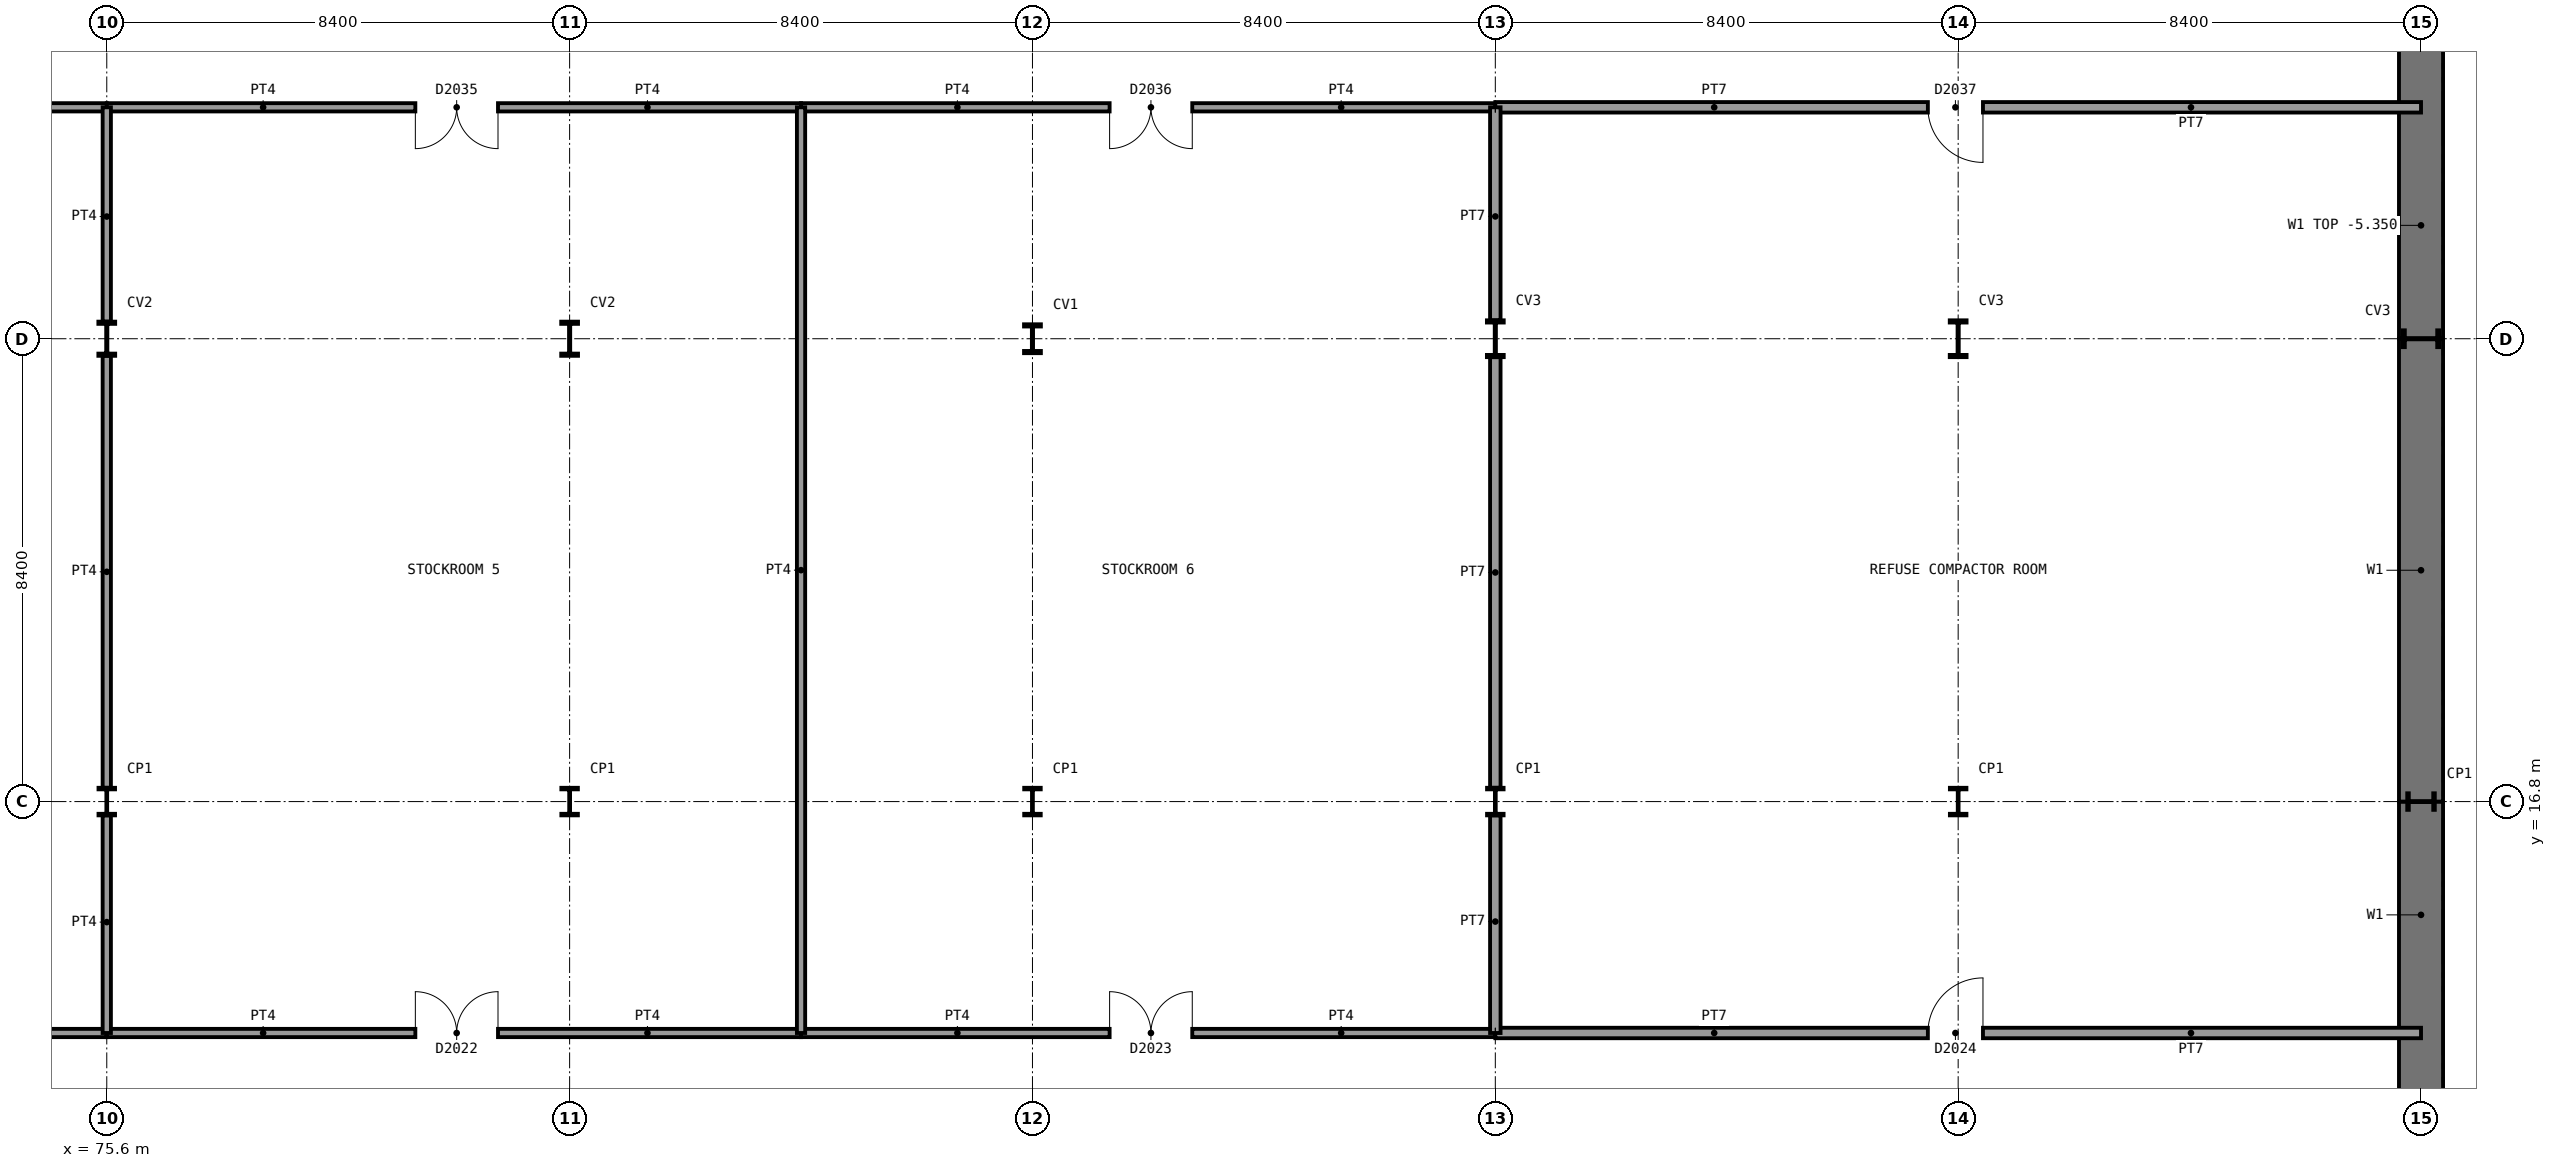
"""IFC4 building model, lengths in metres.
Left out: names, types, materials, properties, quantities, classifications, styles, units other than length and angle.
Written with IfcOpenShell. Run it as: python <this file> out.ifc"""

import sys

from ifc_helpers import new_model, si_unit, direction, frame, frame_2d, origin, origin_2d, place, context, subcontext, project, spatial, rectangle, i_section, extrude, element, fill, save


model = new_model("IFC4")
c1 = context("Model", 3, precision=1e-05, world=origin(), true_north=direction((0.0, 1.0)))
c2 = subcontext(c1, "Body", "Model", "MODEL_VIEW")
j1 = project(units=[si_unit("LENGTHUNIT", "METRE"), si_unit("PLANEANGLEUNIT", "RADIAN")], contexts=[c1])
p1 = place(None, origin())
s1 = spatial("IfcSite", under=j1, at=p1, CompositionType="ELEMENT")
p2 = place(p1, origin())
s2 = spatial("IfcBuilding", under=s1, at=p2, CompositionType="ELEMENT")
p3 = place(p2, frame((0.0, 0.0, -9.9)))
s3 = spatial("IfcBuildingStorey", under=s2, at=p3, CompositionType="ELEMENT", Elevation=-9.9)
p4 = place(p3, frame((117.6, 8.55, 0.0), z_axis=(0.0, 0.0, 1.0), x_axis=(0.0, 1.0, 0.0)))
e1 = element("IfcWall", 1, at=p4, inside=s3, PredefinedType="SOLIDWALL", context=c2, shape_type="SweptSolid", body=[
    extrude(rectangle(XDim=8.25, YDim=0.8, at=frame_2d((4.125, 0.0))), origin(), (0.0, 0.0, 1.0), 4.65),
])
p5 = place(p3, frame((117.6, 16.8, 0.0), z_axis=(0.0, 0.0, 1.0), x_axis=(0.0, 1.0, 0.0)))
e2 = element("IfcWall", 2, at=p5, inside=s3, PredefinedType="SOLIDWALL", context=c2, shape_type="SweptSolid", body=[
    extrude(rectangle(XDim=8.4, YDim=0.8, at=frame_2d((4.2, 0.0))), origin(), (0.0, 0.0, 1.0), 4.65),
])
p6 = place(p3, frame((117.6, 25.2, 0.0), z_axis=(0.0, 0.0, 1.0), x_axis=(0.0, 1.0, 0.0)))
e3 = element("IfcWall", 3, at=p6, inside=s3, PredefinedType="SOLIDWALL", context=c2, shape_type="SweptSolid", body=[
    extrude(rectangle(XDim=12.6, YDim=0.8, at=frame_2d((6.3, 0.0))), origin(), (0.0, 0.0, 1.0), 4.55),
])
p7 = place(p3, frame((75.6, 16.8, 0.0), z_axis=(0.0, 0.0, 1.0), x_axis=(1.0, 0.0, 0.0)))
e4 = element("IfcColumn", 4, at=p7, inside=s3, PredefinedType="COLUMN", context=c2, shape_type="SweptSolid", body=[
    extrude(i_section(OverallWidth=0.3, OverallDepth=0.5, WebThickness=0.014, FlangeThickness=0.028, FilletRadius=0.027, at=origin_2d()), origin(), (0.0, 0.0, 1.0), 5.0),
])
p8 = place(p3, frame((75.6, 25.2, 0.0), z_axis=(0.0, 0.0, 1.0), x_axis=(1.0, 0.0, 0.0)))
e5 = element("IfcColumn", 5, at=p8, inside=s3, PredefinedType="COLUMN", context=c2, shape_type="SweptSolid", body=[
    extrude(i_section(OverallWidth=0.305, OverallDepth=0.62, WebThickness=0.021, FlangeThickness=0.04, FilletRadius=0.027, at=origin_2d()), origin(), (0.0, 0.0, 1.0), 5.0),
])
p9 = place(p3, frame((84.0, 16.8, 0.0), z_axis=(0.0, 0.0, 1.0), x_axis=(1.0, 0.0, 0.0)))
e6 = element("IfcColumn", 6, at=p9, inside=s3, PredefinedType="COLUMN", context=c2, shape_type="SweptSolid", body=[
    extrude(i_section(OverallWidth=0.3, OverallDepth=0.5, WebThickness=0.014, FlangeThickness=0.028, FilletRadius=0.027, at=origin_2d()), origin(), (0.0, 0.0, 1.0), 5.0),
])
p10 = place(p3, frame((84.0, 25.2, 0.0), z_axis=(0.0, 0.0, 1.0), x_axis=(1.0, 0.0, 0.0)))
e7 = element("IfcColumn", 7, at=p10, inside=s3, PredefinedType="COLUMN", context=c2, shape_type="SweptSolid", body=[
    extrude(i_section(OverallWidth=0.305, OverallDepth=0.62, WebThickness=0.021, FlangeThickness=0.04, FilletRadius=0.027, at=origin_2d()), origin(), (0.0, 0.0, 1.0), 5.0),
])
p11 = place(p3, frame((92.4, 16.8, 0.0), z_axis=(0.0, 0.0, 1.0), x_axis=(1.0, 0.0, 0.0)))
e8 = element("IfcColumn", 8, at=p11, inside=s3, PredefinedType="COLUMN", context=c2, shape_type="SweptSolid", body=[
    extrude(i_section(OverallWidth=0.3, OverallDepth=0.5, WebThickness=0.014, FlangeThickness=0.028, FilletRadius=0.027, at=origin_2d()), origin(), (0.0, 0.0, 1.0), 5.0),
])
p12 = place(p3, frame((92.4, 25.2, 0.0), z_axis=(0.0, 0.0, 1.0), x_axis=(1.0, 0.0, 0.0)))
e9 = element("IfcColumn", 9, at=p12, inside=s3, PredefinedType="COLUMN", context=c2, shape_type="SweptSolid", body=[
    extrude(i_section(OverallWidth=0.306, OverallDepth=0.524, WebThickness=0.021, FlangeThickness=0.04, FilletRadius=0.027, at=origin_2d()), origin(), (0.0, 0.0, 1.0), 5.0),
])
p13 = place(p3, frame((100.8, 16.8, 0.0), z_axis=(0.0, 0.0, 1.0), x_axis=(1.0, 0.0, 0.0)))
e10 = element("IfcColumn", 10, at=p13, inside=s3, PredefinedType="COLUMN", context=c2, shape_type="SweptSolid", body=[
    extrude(i_section(OverallWidth=0.3, OverallDepth=0.5, WebThickness=0.014, FlangeThickness=0.028, FilletRadius=0.027, at=origin_2d()), origin(), (0.0, 0.0, 1.0), 5.0),
])
p14 = place(p3, frame((100.8, 25.2, 0.0), z_axis=(0.0, 0.0, 1.0), x_axis=(1.0, 0.0, 0.0)))
e11 = element("IfcColumn", 11, at=p14, inside=s3, PredefinedType="COLUMN", context=c2, shape_type="SweptSolid", body=[
    extrude(i_section(OverallWidth=0.305, OverallDepth=0.668, WebThickness=0.021, FlangeThickness=0.04, FilletRadius=0.027, at=origin_2d()), origin(), (0.0, 0.0, 1.0), 5.0),
])
p15 = place(p3, frame((109.2, 16.8, 0.0), z_axis=(0.0, 0.0, 1.0), x_axis=(1.0, 0.0, 0.0)))
e12 = element("IfcColumn", 12, at=p15, inside=s3, PredefinedType="COLUMN", context=c2, shape_type="SweptSolid", body=[
    extrude(i_section(OverallWidth=0.3, OverallDepth=0.5, WebThickness=0.014, FlangeThickness=0.028, FilletRadius=0.027, at=origin_2d()), origin(), (0.0, 0.0, 1.0), 5.0),
])
p16 = place(p3, frame((109.2, 25.2, 0.0), z_axis=(0.0, 0.0, 1.0), x_axis=(1.0, 0.0, 0.0)))
e13 = element("IfcColumn", 13, at=p16, inside=s3, PredefinedType="COLUMN", context=c2, shape_type="SweptSolid", body=[
    extrude(i_section(OverallWidth=0.305, OverallDepth=0.668, WebThickness=0.021, FlangeThickness=0.04, FilletRadius=0.027, at=origin_2d()), origin(), (0.0, 0.0, 1.0), 5.0),
])
p17 = place(p3, frame((117.6, 16.8, 0.0), z_axis=(0.0, 0.0, 1.0), x_axis=(0.0, 1.0, 0.0)))
e14 = element("IfcColumn", 14, at=p17, inside=s3, PredefinedType="COLUMN", context=c2, shape_type="SweptSolid", body=[
    extrude(i_section(OverallWidth=0.3, OverallDepth=0.5, WebThickness=0.014, FlangeThickness=0.028, FilletRadius=0.027, at=origin_2d()), origin(), (0.0, 0.0, 1.0), 5.0),
])
p18 = place(p3, frame((117.6, 25.2, 0.0), z_axis=(0.0, 0.0, 1.0), x_axis=(0.0, 1.0, 0.0)))
e15 = element("IfcColumn", 15, at=p18, inside=s3, PredefinedType="COLUMN", context=c2, shape_type="SweptSolid", body=[
    extrude(i_section(OverallWidth=0.305, OverallDepth=0.668, WebThickness=0.021, FlangeThickness=0.04, FilletRadius=0.027, at=origin_2d()), origin(), (0.0, 0.0, 1.0), 5.0),
])
p19 = place(p3, frame((58.8, 12.6, 0.0), z_axis=(0.0, 0.0, 1.0), x_axis=(1.0, 0.0, 0.0)))
e16 = element("IfcWall", 16, at=p19, inside=s3, PredefinedType="SOLIDWALL", context=c2, shape_type="SweptSolid", body=[
    extrude(rectangle(XDim=16.8, YDim=0.15, at=frame_2d((8.4, 0.0))), origin(), (0.0, 0.0, 1.0), 4.55),
])
p20 = place(p19, frame((7.6, 0.0, 0.0)))
e17 = element("IfcOpeningElement", 17, at=p20, cuts=e16, PredefinedType="OPENING", context=c2, shape_type="SweptSolid", body=[
    extrude(rectangle(XDim=1.5, YDim=2.1, at=frame_2d((0.75, 1.05))), frame((0.0, 0.085, 0.0), z_axis=(0.0, -1.0, 0.0), x_axis=(1.0, 0.0, 0.0)), (0.0, 0.0, 1.0), 0.17),
])
p21 = place(p3, frame((75.6, 12.6, 0.0), z_axis=(0.0, 0.0, 1.0), x_axis=(1.0, 0.0, 0.0)))
e18 = element("IfcWall", 18, at=p21, inside=s3, PredefinedType="SOLIDWALL", context=c2, shape_type="SweptSolid", body=[
    extrude(rectangle(XDim=12.6, YDim=0.15, at=frame_2d((6.3, 0.0))), origin(), (0.0, 0.0, 1.0), 4.55),
])
p22 = place(p21, frame((5.6, 0.0, 0.0)))
e19 = element("IfcOpeningElement", 19, at=p22, cuts=e18, PredefinedType="OPENING", context=c2, shape_type="SweptSolid", body=[
    extrude(rectangle(XDim=1.5, YDim=2.1, at=frame_2d((0.75, 1.05))), frame((0.0, 0.085, 0.0), z_axis=(0.0, -1.0, 0.0), x_axis=(1.0, 0.0, 0.0)), (0.0, 0.0, 1.0), 0.17),
])
p23 = place(p3, frame((88.2, 12.6, 0.0), z_axis=(0.0, 0.0, 1.0), x_axis=(1.0, 0.0, 0.0)))
e20 = element("IfcWall", 20, at=p23, inside=s3, PredefinedType="SOLIDWALL", context=c2, shape_type="SweptSolid", body=[
    extrude(rectangle(XDim=12.6, YDim=0.15, at=frame_2d((6.3, 0.0))), origin(), (0.0, 0.0, 1.0), 4.55),
])
p24 = place(p23, frame((5.6, 0.0, 0.0)))
e21 = element("IfcOpeningElement", 21, at=p24, cuts=e20, PredefinedType="OPENING", context=c2, shape_type="SweptSolid", body=[
    extrude(rectangle(XDim=1.5, YDim=2.1, at=frame_2d((0.75, 1.05))), frame((0.0, 0.085, 0.0), z_axis=(0.0, -1.0, 0.0), x_axis=(1.0, 0.0, 0.0)), (0.0, 0.0, 1.0), 0.17),
])
p25 = place(p3, frame((100.8, 12.6, 0.0), z_axis=(0.0, 0.0, 1.0), x_axis=(1.0, 0.0, 0.0)))
e22 = element("IfcWall", 22, at=p25, inside=s3, PredefinedType="SOLIDWALL", context=c2, shape_type="SweptSolid", body=[
    extrude(rectangle(XDim=16.8, YDim=0.19, at=frame_2d((8.4, 0.0))), origin(), (0.0, 0.0, 1.0), 4.55),
])
p26 = place(p25, frame((7.85, 0.0, 0.0)))
e23 = element("IfcOpeningElement", 23, at=p26, cuts=e22, PredefinedType="OPENING", context=c2, shape_type="SweptSolid", body=[
    extrude(rectangle(XDim=1.0, YDim=2.1, at=frame_2d((0.5, 1.05))), frame((0.0, 0.105, 0.0), z_axis=(0.0, -1.0, 0.0), x_axis=(1.0, 0.0, 0.0)), (0.0, 0.0, 1.0), 0.21),
])
p27 = place(p3, frame((58.8, 29.4, 0.0), z_axis=(0.0, 0.0, 1.0), x_axis=(1.0, 0.0, 0.0)))
e24 = element("IfcWall", 24, at=p27, inside=s3, PredefinedType="SOLIDWALL", context=c2, shape_type="SweptSolid", body=[
    extrude(rectangle(XDim=16.8, YDim=0.15, at=frame_2d((8.4, 0.0))), origin(), (0.0, 0.0, 1.0), 4.55),
])
p28 = place(p27, frame((7.6, 0.0, 0.0)))
e25 = element("IfcOpeningElement", 25, at=p28, cuts=e24, PredefinedType="OPENING", context=c2, shape_type="SweptSolid", body=[
    extrude(rectangle(XDim=1.5, YDim=2.1, at=frame_2d((0.75, 1.05))), frame((0.0, 0.085, 0.0), z_axis=(0.0, -1.0, 0.0), x_axis=(1.0, 0.0, 0.0)), (0.0, 0.0, 1.0), 0.17),
])
p29 = place(p3, frame((75.6, 29.4, 0.0), z_axis=(0.0, 0.0, 1.0), x_axis=(1.0, 0.0, 0.0)))
e26 = element("IfcWall", 26, at=p29, inside=s3, PredefinedType="SOLIDWALL", context=c2, shape_type="SweptSolid", body=[
    extrude(rectangle(XDim=12.6, YDim=0.15, at=frame_2d((6.3, 0.0))), origin(), (0.0, 0.0, 1.0), 4.55),
])
p30 = place(p29, frame((5.6, 0.0, 0.0)))
e27 = element("IfcOpeningElement", 27, at=p30, cuts=e26, PredefinedType="OPENING", context=c2, shape_type="SweptSolid", body=[
    extrude(rectangle(XDim=1.5, YDim=2.1, at=frame_2d((0.75, 1.05))), frame((0.0, 0.085, 0.0), z_axis=(0.0, -1.0, 0.0), x_axis=(1.0, 0.0, 0.0)), (0.0, 0.0, 1.0), 0.17),
])
p31 = place(p3, frame((88.2, 29.4, 0.0), z_axis=(0.0, 0.0, 1.0), x_axis=(1.0, 0.0, 0.0)))
e28 = element("IfcWall", 28, at=p31, inside=s3, PredefinedType="SOLIDWALL", context=c2, shape_type="SweptSolid", body=[
    extrude(rectangle(XDim=12.6, YDim=0.15, at=frame_2d((6.3, 0.0))), origin(), (0.0, 0.0, 1.0), 4.55),
])
p32 = place(p31, frame((5.6, 0.0, 0.0)))
e29 = element("IfcOpeningElement", 29, at=p32, cuts=e28, PredefinedType="OPENING", context=c2, shape_type="SweptSolid", body=[
    extrude(rectangle(XDim=1.5, YDim=2.1, at=frame_2d((0.75, 1.05))), frame((0.0, 0.085, 0.0), z_axis=(0.0, -1.0, 0.0), x_axis=(1.0, 0.0, 0.0)), (0.0, 0.0, 1.0), 0.17),
])
p33 = place(p3, frame((100.8, 29.4, 0.0), z_axis=(0.0, 0.0, 1.0), x_axis=(1.0, 0.0, 0.0)))
e30 = element("IfcWall", 30, at=p33, inside=s3, PredefinedType="SOLIDWALL", context=c2, shape_type="SweptSolid", body=[
    extrude(rectangle(XDim=16.8, YDim=0.19, at=frame_2d((8.4, 0.0))), origin(), (0.0, 0.0, 1.0), 4.55),
])
p34 = place(p33, frame((7.85, 0.0, 0.0)))
e31 = element("IfcOpeningElement", 31, at=p34, cuts=e30, PredefinedType="OPENING", context=c2, shape_type="SweptSolid", body=[
    extrude(rectangle(XDim=1.0, YDim=2.1, at=frame_2d((0.5, 1.05))), frame((0.0, 0.105, 0.0), z_axis=(0.0, -1.0, 0.0), x_axis=(1.0, 0.0, 0.0)), (0.0, 0.0, 1.0), 0.21),
])
p35 = place(p3, frame((75.6, 12.6, 0.0), z_axis=(0.0, 0.0, 1.0), x_axis=(0.0, 1.0, 0.0)))
e32 = element("IfcWall", 32, at=p35, inside=s3, PredefinedType="SOLIDWALL", context=c2, shape_type="SweptSolid", body=[
    extrude(rectangle(XDim=3.95, YDim=0.15, at=frame_2d((1.975, 0.0))), origin(), (0.0, 0.0, 1.0), 4.55),
])
p36 = place(p3, frame((75.6, 17.05, 0.0), z_axis=(0.0, 0.0, 1.0), x_axis=(0.0, 1.0, 0.0)))
e33 = element("IfcWall", 33, at=p36, inside=s3, PredefinedType="SOLIDWALL", context=c2, shape_type="SweptSolid", body=[
    extrude(rectangle(XDim=7.84, YDim=0.15, at=frame_2d((3.92, 0.0))), origin(), (0.0, 0.0, 1.0), 4.55),
])
p37 = place(p3, frame((75.6, 25.51, 0.0), z_axis=(0.0, 0.0, 1.0), x_axis=(0.0, 1.0, 0.0)))
e34 = element("IfcWall", 34, at=p37, inside=s3, PredefinedType="SOLIDWALL", context=c2, shape_type="SweptSolid", body=[
    extrude(rectangle(XDim=3.89, YDim=0.15, at=frame_2d((1.945, 0.0))), origin(), (0.0, 0.0, 1.0), 4.55),
])
p38 = place(p3, frame((88.2, 12.6, 0.0), z_axis=(0.0, 0.0, 1.0), x_axis=(0.0, 1.0, 0.0)))
e35 = element("IfcWall", 35, at=p38, inside=s3, PredefinedType="SOLIDWALL", context=c2, shape_type="SweptSolid", body=[
    extrude(rectangle(XDim=16.8, YDim=0.15, at=frame_2d((8.4, 0.0))), origin(), (0.0, 0.0, 1.0), 4.55),
])
p39 = place(p3, frame((100.8, 12.6, 0.0), z_axis=(0.0, 0.0, 1.0), x_axis=(0.0, 1.0, 0.0)))
e36 = element("IfcWall", 36, at=p39, inside=s3, PredefinedType="SOLIDWALL", context=c2, shape_type="SweptSolid", body=[
    extrude(rectangle(XDim=3.95, YDim=0.19, at=frame_2d((1.975, 0.0))), origin(), (0.0, 0.0, 1.0), 4.55),
])
p40 = place(p3, frame((100.8, 17.05, 0.0), z_axis=(0.0, 0.0, 1.0), x_axis=(0.0, 1.0, 0.0)))
e37 = element("IfcWall", 37, at=p40, inside=s3, PredefinedType="SOLIDWALL", context=c2, shape_type="SweptSolid", body=[
    extrude(rectangle(XDim=7.816, YDim=0.19, at=frame_2d((3.908, 0.0))), origin(), (0.0, 0.0, 1.0), 4.55),
])
p41 = place(p3, frame((100.8, 25.534, 0.0), z_axis=(0.0, 0.0, 1.0), x_axis=(0.0, 1.0, 0.0)))
e38 = element("IfcWall", 38, at=p41, inside=s3, PredefinedType="SOLIDWALL", context=c2, shape_type="SweptSolid", body=[
    extrude(rectangle(XDim=3.866, YDim=0.19, at=frame_2d((1.933, 0.0))), origin(), (0.0, 0.0, 1.0), 4.55),
])
p42 = place(p22, origin())
e39 = element("IfcDoor", 39, at=p42, inside=s3, OperationType="DOUBLE_DOOR_SINGLE_SWING", PredefinedType="DOOR", context=c2, shape_type="SweptSolid", body=[
    extrude(rectangle(XDim=1.5, YDim=2.1, at=frame_2d((0.75, 1.05))), frame((0.0, 0.025, 0.0), z_axis=(0.0, -1.0, 0.0), x_axis=(1.0, 0.0, 0.0)), (0.0, 0.0, 1.0), 0.05),
])
fill(e19, e39)
p43 = place(p24, origin())
e40 = element("IfcDoor", 40, at=p43, inside=s3, OperationType="DOUBLE_DOOR_SINGLE_SWING", PredefinedType="DOOR", context=c2, shape_type="SweptSolid", body=[
    extrude(rectangle(XDim=1.5, YDim=2.1, at=frame_2d((0.75, 1.05))), frame((0.0, 0.025, 0.0), z_axis=(0.0, -1.0, 0.0), x_axis=(1.0, 0.0, 0.0)), (0.0, 0.0, 1.0), 0.05),
])
fill(e21, e40)
p44 = place(p26, origin())
e41 = element("IfcDoor", 41, at=p44, inside=s3, OperationType="SINGLE_SWING_RIGHT", PredefinedType="DOOR", context=c2, shape_type="SweptSolid", body=[
    extrude(rectangle(XDim=1.0, YDim=2.1, at=frame_2d((0.5, 1.05))), frame((0.0, 0.025, 0.0), z_axis=(0.0, -1.0, 0.0), x_axis=(1.0, 0.0, 0.0)), (0.0, 0.0, 1.0), 0.05),
])
fill(e23, e41)
p45 = place(p30, frame((1.5, 0.0, 0.0), z_axis=(0.0, 0.0, 1.0), x_axis=(-1.0, 0.0, 0.0)))
e42 = element("IfcDoor", 42, at=p45, inside=s3, OperationType="DOUBLE_DOOR_SINGLE_SWING", PredefinedType="DOOR", context=c2, shape_type="SweptSolid", body=[
    extrude(rectangle(XDim=1.5, YDim=2.1, at=frame_2d((0.75, 1.05))), frame((0.0, 0.025, 0.0), z_axis=(0.0, -1.0, 0.0), x_axis=(1.0, 0.0, 0.0)), (0.0, 0.0, 1.0), 0.05),
])
fill(e27, e42)
p46 = place(p32, frame((1.5, 0.0, 0.0), z_axis=(0.0, 0.0, 1.0), x_axis=(-1.0, 0.0, 0.0)))
e43 = element("IfcDoor", 43, at=p46, inside=s3, OperationType="DOUBLE_DOOR_SINGLE_SWING", PredefinedType="DOOR", context=c2, shape_type="SweptSolid", body=[
    extrude(rectangle(XDim=1.5, YDim=2.1, at=frame_2d((0.75, 1.05))), frame((0.0, 0.025, 0.0), z_axis=(0.0, -1.0, 0.0), x_axis=(1.0, 0.0, 0.0)), (0.0, 0.0, 1.0), 0.05),
])
fill(e29, e43)
p47 = place(p34, frame((1.0, 0.0, 0.0), z_axis=(0.0, 0.0, 1.0), x_axis=(-1.0, 0.0, 0.0)))
e44 = element("IfcDoor", 44, at=p47, inside=s3, OperationType="SINGLE_SWING_LEFT", PredefinedType="DOOR", context=c2, shape_type="SweptSolid", body=[
    extrude(rectangle(XDim=1.0, YDim=2.1, at=frame_2d((0.5, 1.05))), frame((0.0, 0.025, 0.0), z_axis=(0.0, -1.0, 0.0), x_axis=(1.0, 0.0, 0.0)), (0.0, 0.0, 1.0), 0.05),
])
fill(e31, e44)
save(model, sys.argv[1])
